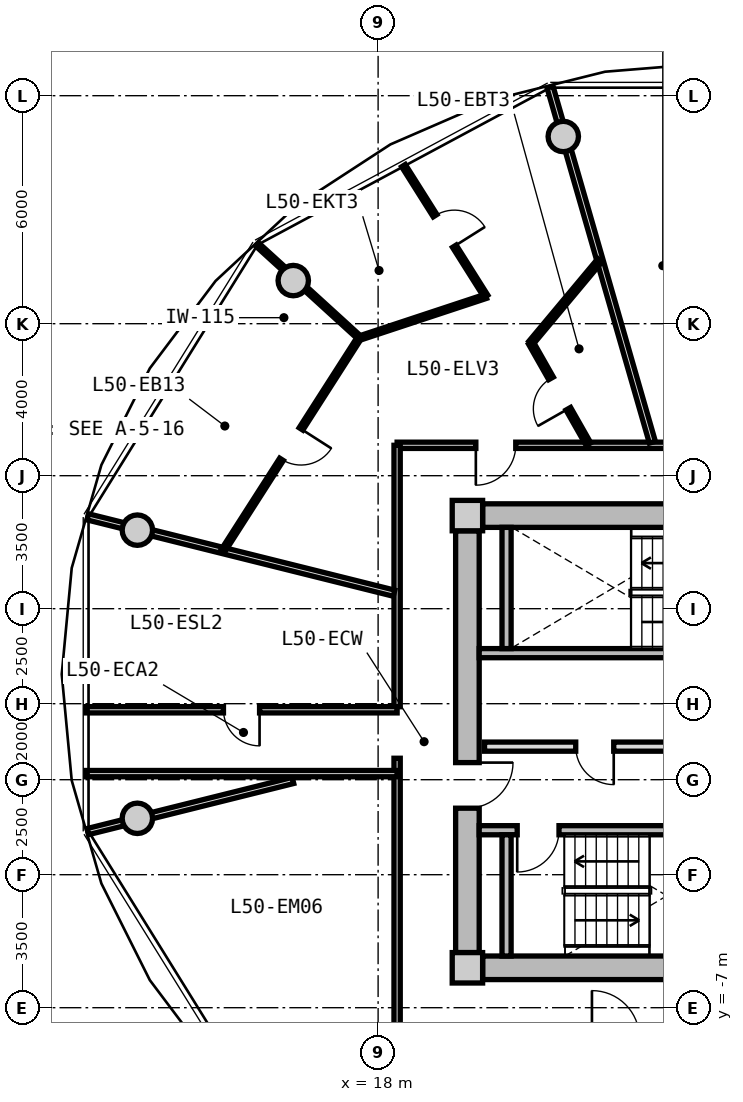
"""IFC4 building model, lengths in metres.
Left out: names, types, materials, properties, quantities, classifications, styles, units other than length and angle.
Written with IfcOpenShell. Run it as: python <this file> out.ifc"""

import sys

from ifc_helpers import new_model, si_unit, direction, frame, frame_2d, origin, origin_2d, place, context, subcontext, project, spatial, rectangle, circle, extrude, source, transform, mapped, element, fill, save


model = new_model("IFC4")
c1 = context("Model", 3, precision=1e-05, world=origin(), true_north=direction((0.0, 1.0)))
c2 = subcontext(c1, "Body", "Model", "MODEL_VIEW")
j1 = project(units=[si_unit("LENGTHUNIT", "METRE"), si_unit("PLANEANGLEUNIT", "RADIAN")], contexts=[c1])
p1 = place(None, origin())
s1 = spatial("IfcSite", under=j1, at=p1, CompositionType="ELEMENT")
p2 = place(p1, origin())
s2 = spatial("IfcBuilding", under=s1, at=p2, CompositionType="ELEMENT")
p3 = place(p2, frame((0.0, 0.0, 161.75)))
s3 = spatial("IfcBuildingStorey", under=s2, at=p3, CompositionType="ELEMENT", Elevation=161.75)
m1 = source(origin(), c2, "Body", "SweptSolid", [
    extrude(rectangle(XDim=0.8, YDim=0.8, at=origin_2d()), origin(), (0.0, 0.0, 1.0), 3.05),
])
for number, where, z_axis, x_axis in (
    (1, (20.35, -5.95, 0.0), (0.0, 0.0, 1.0), (1.0, 0.0, 0.0)),
    (2, (20.35, 5.95, 0.0), (0.0, 0.0, 1.0), (1.0, 0.0, 0.0)),
):
    element("IfcColumn", number, at=place(p3, frame(where, z_axis=z_axis, x_axis=x_axis)), inside=s3, PredefinedType="COLUMN", context=c2, shape_type="MappedRepresentation", body=[
        mapped(m1, transform((0.0, 0.0, 0.0), x_axis=(1.0, 0.0, 0.0), y_axis=(0.0, 1.0, 0.0), z_axis=(0.0, 0.0, 1.0), scale=1.0)),
    ])
m2 = source(origin(), c2, "Body", "SweptSolid", [
    extrude(rectangle(XDim=14.5, YDim=0.62, at=frame_2d((7.25, 0.0))), origin(), (0.0, 0.0, 1.0), 2.81),
])
for number, where, z_axis, x_axis in (
    (3, (20.75, 5.95, 0.0), (0.0, 0.0, 1.0), (1.0, 0.0, 0.0)),
    (4, (35.25, -5.95, 0.0), (0.0, 0.0, 1.0), (-1.0, 0.0, 0.0)),
):
    element("IfcWall", number, at=place(p3, frame(where, z_axis=z_axis, x_axis=x_axis)), inside=s3, PredefinedType="SHEAR", context=c2, shape_type="MappedRepresentation", body=[
        mapped(m2, transform((0.0, 0.0, 0.0), x_axis=(1.0, 0.0, 0.0), y_axis=(0.0, 1.0, 0.0), z_axis=(0.0, 0.0, 1.0), scale=1.0)),
    ])
m3 = source(origin(), c2, "Body", "SweptSolid", [
    extrude(rectangle(XDim=11.1, YDim=0.62, at=frame_2d((5.55, 0.0))), origin(), (0.0, 0.0, 1.0), 2.81),
])
p4 = place(p3, frame((20.35, -5.55, 0.0), z_axis=(0.0, 0.0, 1.0), x_axis=(0.0, 1.0, 0.0)))
e5 = element("IfcWall", 5, at=p4, inside=s3, PredefinedType="SHEAR", context=c2, shape_type="MappedRepresentation", body=[
    mapped(m3, transform((0.0, 0.0, 0.0), x_axis=(1.0, 0.0, 0.0), y_axis=(0.0, 1.0, 0.0), z_axis=(0.0, 0.0, 1.0), scale=1.0)),
])
p5 = place(p4, frame((3.8, 0.0, 0.0)))
e6 = element("IfcOpeningElement", 6, at=p5, cuts=e5, PredefinedType="OPENING", context=c2, shape_type="SweptSolid", body=[
    extrude(rectangle(XDim=1.2, YDim=2.15, at=frame_2d((0.6, 1.075))), frame((0.0, 0.32, 0.0), z_axis=(0.0, -1.0, 0.0), x_axis=(1.0, 0.0, 0.0)), (0.0, 0.0, 1.0), 0.64),
])
m4 = source(origin(), c2, "Body", "SweptSolid", [
    extrude(circle(Radius=0.4, at=origin_2d()), origin(), (0.0, 0.0, 1.0), 3.05),
])
for number, where, z_axis, x_axis in (
    (7, (22.873, 15.926, 0.0), (0.0, 0.0, 1.0), (1.0, 0.0, 0.0)),
    (8, (15.767, 12.135, 0.0), (0.0, 0.0, 1.0), (1.0, 0.0, 0.0)),
    (9, (11.665, 5.567, 0.0), (0.0, 0.0, 1.0), (1.0, 0.0, 0.0)),
    (10, (11.665, -2.016, 0.0), (0.0, 0.0, 1.0), (1.0, 0.0, 0.0)),
):
    element("IfcColumn", number, at=place(p3, frame(where, z_axis=z_axis, x_axis=x_axis)), inside=s3, PredefinedType="COLUMN", context=c2, shape_type="MappedRepresentation", body=[
        mapped(m4, transform((0.0, 0.0, 0.0), x_axis=(1.0, 0.0, 0.0), y_axis=(0.0, 1.0, 0.0), z_axis=(0.0, 0.0, 1.0), scale=1.0)),
    ])
m5 = source(origin(), c2, "Body", "SweptSolid", [
    extrude(rectangle(XDim=7.88, YDim=0.24, at=frame_2d((3.94, 0.0))), origin(), (0.0, 0.0, 1.0), 2.81),
])
p6 = place(p3, frame((20.66, 2.33, 0.0), z_axis=(0.0, 0.0, 1.0), x_axis=(1.0, 0.0, 0.0)))
e11 = element("IfcWall", 11, at=p6, inside=s3, PredefinedType="PARTITIONING", context=c2, shape_type="MappedRepresentation", body=[
    mapped(m5, transform((0.0, 0.0, 0.0), x_axis=(1.0, 0.0, 0.0), y_axis=(0.0, 1.0, 0.0), z_axis=(0.0, 0.0, 1.0), scale=1.0)),
])
m6 = source(origin(), c2, "Body", "SweptSolid", [
    extrude(rectangle(XDim=3.19, YDim=0.24, at=frame_2d((1.595, 0.0))), origin(), (0.0, 0.0, 1.0), 2.81),
])
p7 = place(p3, frame((21.38, 2.45, 0.0), z_axis=(0.0, 0.0, 1.0), x_axis=(0.0, 1.0, 0.0)))
e12 = element("IfcWall", 12, at=p7, inside=s3, PredefinedType="PARTITIONING", context=c2, shape_type="MappedRepresentation", body=[
    mapped(m6, transform((0.0, 0.0, 0.0), x_axis=(1.0, 0.0, 0.0), y_axis=(0.0, 1.0, 0.0), z_axis=(0.0, 0.0, 1.0), scale=1.0)),
])
p8 = place(p3, frame((20.66, -2.33, 0.0), z_axis=(0.0, 0.0, 1.0), x_axis=(1.0, 0.0, 0.0)))
e13 = element("IfcWall", 13, at=p8, inside=s3, PredefinedType="PARTITIONING", context=c2, shape_type="MappedRepresentation", body=[
    mapped(m5, transform((0.0, 0.0, 0.0), x_axis=(1.0, 0.0, 0.0), y_axis=(0.0, 1.0, 0.0), z_axis=(0.0, 0.0, 1.0), scale=1.0)),
])
p9 = place(p8, frame((1.0, 0.0, 0.0)))
e14 = element("IfcOpeningElement", 14, at=p9, cuts=e13, PredefinedType="OPENING", context=c2, shape_type="SweptSolid", body=[
    extrude(rectangle(XDim=1.1, YDim=2.15, at=frame_2d((0.55, 1.075))), frame((0.0, 0.13, 0.0), z_axis=(0.0, -1.0, 0.0), x_axis=(1.0, 0.0, 0.0)), (0.0, 0.0, 1.0), 0.26),
])
p10 = place(p3, frame((21.38, -5.64, 0.0), z_axis=(0.0, 0.0, 1.0), x_axis=(0.0, 1.0, 0.0)))
e15 = element("IfcWall", 15, at=p10, inside=s3, PredefinedType="PARTITIONING", context=c2, shape_type="MappedRepresentation", body=[
    mapped(m6, transform((0.0, 0.0, 0.0), x_axis=(1.0, 0.0, 0.0), y_axis=(0.0, 1.0, 0.0), z_axis=(0.0, 0.0, 1.0), scale=1.0)),
])
m7 = source(origin(), c2, "Body", "SweptSolid", [
    extrude(rectangle(XDim=7.62, YDim=0.24, at=frame_2d((3.81, 0.0))), origin(), (0.0, 0.0, 1.0), 2.795),
])
p11 = place(p3, frame((20.8, -0.13, 0.0), z_axis=(0.0, 0.0, 1.0), x_axis=(1.0, 0.0, 0.0)))
e16 = element("IfcWall", 16, at=p11, inside=s3, PredefinedType="PARTITIONING", context=c2, shape_type="MappedRepresentation", body=[
    mapped(m7, transform((0.0, 0.0, 0.0), x_axis=(1.0, 0.0, 0.0), y_axis=(0.0, 1.0, 0.0), z_axis=(0.0, 0.0, 1.0), scale=1.0)),
])
p12 = place(p11, frame((6.22, 0.0, 0.0)))
e17 = element("IfcOpeningElement", 17, at=p12, cuts=e16, PredefinedType="OPENING", context=c2, shape_type="SweptSolid", body=[
    extrude(rectangle(XDim=1.0, YDim=2.1, at=frame_2d((0.5, 1.05))), frame((0.0, 0.13, 0.0), z_axis=(0.0, -1.0, 0.0), x_axis=(1.0, 0.0, 0.0)), (0.0, 0.0, 1.0), 0.26),
])
p13 = place(p11, frame((2.4, 0.0, 0.0)))
e18 = element("IfcOpeningElement", 18, at=p13, cuts=e16, PredefinedType="OPENING", context=c2, shape_type="SweptSolid", body=[
    extrude(rectangle(XDim=1.0, YDim=2.1, at=frame_2d((0.5, 1.05))), frame((0.0, 0.13, 0.0), z_axis=(0.0, -1.0, 0.0), x_axis=(1.0, 0.0, 0.0)), (0.0, 0.0, 1.0), 0.26),
])
m8 = source(origin(), c2, "Body", "SweptSolid", [
    extrude(rectangle(XDim=8.58, YDim=0.165, at=frame_2d((4.29, 0.0))), origin(), (0.0, 0.0, 1.0), 2.795),
])
p14 = place(p3, frame((18.5, 7.8, 0.0), z_axis=(0.0, 0.0, 1.0), x_axis=(1.0, 0.0, 0.0)))
e19 = element("IfcWall", 19, at=p14, inside=s3, PredefinedType="PARTITIONING", context=c2, shape_type="MappedRepresentation", body=[
    mapped(m8, transform((0.0, 0.0, 0.0), x_axis=(1.0, 0.0, 0.0), y_axis=(0.0, 1.0, 0.0), z_axis=(0.0, 0.0, 1.0), scale=1.0)),
])
p15 = place(p14, frame((2.072, 0.0, 0.0)))
e20 = element("IfcOpeningElement", 20, at=p15, cuts=e19, PredefinedType="OPENING", context=c2, shape_type="SweptSolid", body=[
    extrude(rectangle(XDim=1.05, YDim=2.15, at=frame_2d((0.525, 1.075))), frame((0.0, 0.093, 0.0), z_axis=(0.0, -1.0, 0.0), x_axis=(1.0, 0.0, 0.0)), (0.0, 0.0, 1.0), 0.185),
])
m9 = source(origin(), c2, "Body", "SweptSolid", [
    extrude(rectangle(XDim=7.365, YDim=0.165, at=frame_2d((3.682, 0.0))), origin(), (0.0, 0.0, 1.0), 2.795),
])
p16 = place(p3, frame((18.5, -7.8, 0.0), z_axis=(0.0, 0.0, 1.0), x_axis=(0.0, 1.0, 0.0)))
e21 = element("IfcWall", 21, at=p16, inside=s3, PredefinedType="PARTITIONING", context=c2, shape_type="MappedRepresentation", body=[
    mapped(m9, transform((0.0, 0.0, 0.0), x_axis=(1.0, 0.0, 0.0), y_axis=(0.0, 1.0, 0.0), z_axis=(0.0, 0.0, 1.0), scale=1.0)),
])
m10 = source(origin(), c2, "Body", "SweptSolid", [
    extrude(rectangle(XDim=6.88, YDim=0.165, at=frame_2d((3.44, 0.0))), origin(), (0.0, 0.0, 1.0), 2.795),
])
p17 = place(p3, frame((18.5, 0.92, 0.0), z_axis=(0.0, 0.0, 1.0), x_axis=(0.0, 1.0, 0.0)))
e22 = element("IfcWall", 22, at=p17, inside=s3, PredefinedType="PARTITIONING", context=c2, shape_type="MappedRepresentation", body=[
    mapped(m10, transform((0.0, 0.0, 0.0), x_axis=(1.0, 0.0, 0.0), y_axis=(0.0, 1.0, 0.0), z_axis=(0.0, 0.0, 1.0), scale=1.0)),
])
m11 = source(origin(), c2, "Body", "SweptSolid", [
    extrude(rectangle(XDim=9.73, YDim=0.165, at=frame_2d((4.865, 0.0))), origin(), (0.0, 0.0, 1.0), 2.345),
])
p18 = place(p3, frame((25.217, 7.88, 0.0), z_axis=(0.0, 0.0, 1.0), x_axis=(-0.27679492614, 0.960929013436, 0.0)))
e23 = element("IfcWall", 23, at=p18, inside=s3, PredefinedType="PARTITIONING", context=c2, shape_type="MappedRepresentation", body=[
    mapped(m11, transform((0.0, 0.0, 0.0), x_axis=(1.0, 0.0, 0.0), y_axis=(0.0, 1.0, 0.0), z_axis=(0.0, 0.0, 1.0), scale=1.0)),
])
m12 = source(origin(), c2, "Body", "SweptSolid", [
    extrude(rectangle(XDim=8.305, YDim=0.165, at=frame_2d((4.153, 0.0))), origin(), (0.0, 0.0, 1.0), 2.345),
])
p19 = place(p3, frame((18.42, 3.908, 0.0), z_axis=(0.0, 0.0, 1.0), x_axis=(-0.970309994378, 0.241864662175, 0.0)))
e24 = element("IfcWall", 24, at=p19, inside=s3, PredefinedType="PARTITIONING", context=c2, shape_type="MappedRepresentation", body=[
    mapped(m12, transform((0.0, 0.0, 0.0), x_axis=(1.0, 0.0, 0.0), y_axis=(0.0, 1.0, 0.0), z_axis=(0.0, 0.0, 1.0), scale=1.0)),
])
m13 = source(origin(), c2, "Body", "SweptSolid", [
    extrude(rectangle(XDim=5.564, YDim=0.165, at=frame_2d((2.782, 0.0))), origin(), (0.0, 0.0, 1.0), 2.345),
])
p20 = place(p3, frame((15.76, -1.02, 0.0), z_axis=(0.0, 0.0, 1.0), x_axis=(-0.970315176167, -0.241843872984, 0.0)))
e25 = element("IfcWall", 25, at=p20, inside=s3, PredefinedType="PARTITIONING", context=c2, shape_type="MappedRepresentation", body=[
    mapped(m13, transform((0.0, 0.0, 0.0), x_axis=(1.0, 0.0, 0.0), y_axis=(0.0, 1.0, 0.0), z_axis=(0.0, 0.0, 1.0), scale=1.0)),
])
m14 = source(origin(), c2, "Body", "SweptSolid", [
    extrude(rectangle(XDim=8.189, YDim=0.165, at=frame_2d((4.094, 0.0))), origin(), (0.0, 0.0, 1.0), 2.795),
])
p21 = place(p3, frame((10.311, 0.84, 0.0), z_axis=(0.0, 0.0, 1.0), x_axis=(1.0, 0.0, 0.0)))
e26 = element("IfcWall", 26, at=p21, inside=s3, PredefinedType="PARTITIONING", context=c2, shape_type="MappedRepresentation", body=[
    mapped(m14, transform((0.0, 0.0, 0.0), x_axis=(1.0, 0.0, 0.0), y_axis=(0.0, 1.0, 0.0), z_axis=(0.0, 0.0, 1.0), scale=1.0)),
])
p22 = place(p21, frame((3.619, 0.0, 0.0)))
e27 = element("IfcOpeningElement", 27, at=p22, cuts=e26, PredefinedType="OPENING", context=c2, shape_type="SweptSolid", body=[
    extrude(rectangle(XDim=0.95, YDim=2.1, at=frame_2d((0.475, 1.05))), frame((0.0, 0.093, 0.0), z_axis=(0.0, -1.0, 0.0), x_axis=(1.0, 0.0, 0.0)), (0.0, 0.0, 1.0), 0.185),
])
p23 = place(p3, frame((18.5, -0.84, 0.0), z_axis=(0.0, 0.0, 1.0), x_axis=(-1.0, 0.0, 0.0)))
e28 = element("IfcWall", 28, at=p23, inside=s3, PredefinedType="PARTITIONING", context=c2, shape_type="MappedRepresentation", body=[
    mapped(m14, transform((0.0, 0.0, 0.0), x_axis=(1.0, 0.0, 0.0), y_axis=(0.0, 1.0, 0.0), z_axis=(0.0, 0.0, 1.0), scale=1.0)),
])
m15 = source(origin(), c2, "Body", "SweptSolid", [
    extrude(rectangle(XDim=6.654, YDim=0.115, at=frame_2d((3.327, 0.0))), origin(), (0.0, 0.0, 1.0), 2.795),
])
p24 = place(p3, frame((17.509, 10.632, 0.0), z_axis=(0.0, 0.0, 1.0), x_axis=(-0.53923796816, -0.842153438332, 0.0)))
e29 = element("IfcWall", 29, at=p24, inside=s3, PredefinedType="PARTITIONING", context=c2, shape_type="MappedRepresentation", body=[
    mapped(m15, transform((0.0, 0.0, 0.0), x_axis=(1.0, 0.0, 0.0), y_axis=(0.0, 1.0, 0.0), z_axis=(0.0, 0.0, 1.0), scale=1.0)),
])
p25 = place(p24, frame((2.852, 0.0, 0.0)))
e30 = element("IfcOpeningElement", 30, at=p25, cuts=e29, PredefinedType="OPENING", context=c2, shape_type="SweptSolid", body=[
    extrude(rectangle(XDim=0.95, YDim=2.1, at=frame_2d((0.475, 1.05))), frame((0.0, 0.067, 0.0), z_axis=(0.0, -1.0, 0.0), x_axis=(1.0, 0.0, 0.0)), (0.0, 0.0, 1.0), 0.135),
])
m16 = source(origin(), c2, "Body", "SweptSolid", [
    extrude(rectangle(XDim=3.648, YDim=0.115, at=frame_2d((1.824, 0.0))), origin(), (0.0, 0.0, 1.0), 2.345),
])
p26 = place(p3, frame((17.509, 10.632, 0.0), z_axis=(0.0, 0.0, 1.0), x_axis=(-0.739109697605, 0.67358507622, 0.0)))
e31 = element("IfcWall", 31, at=p26, inside=s3, PredefinedType="PARTITIONING", context=c2, shape_type="MappedRepresentation", body=[
    mapped(m16, transform((0.0, 0.0, 0.0), x_axis=(1.0, 0.0, 0.0), y_axis=(0.0, 1.0, 0.0), z_axis=(0.0, 0.0, 1.0), scale=1.0)),
])
m17 = source(origin(), c2, "Body", "SweptSolid", [
    extrude(rectangle(XDim=3.064, YDim=0.14, at=frame_2d((1.532, 0.0))), origin(), (0.0, 0.0, 1.0), 2.795),
])
p27 = place(p3, frame((23.534, 7.83, 0.0), z_axis=(0.0, 0.0, 1.0), x_axis=(-0.494103864861, 0.869402881712, 0.0)))
e32 = element("IfcWall", 32, at=p27, inside=s3, PredefinedType="PARTITIONING", context=c2, shape_type="MappedRepresentation", body=[
    mapped(m17, transform((0.0, 0.0, 0.0), x_axis=(1.0, 0.0, 0.0), y_axis=(0.0, 1.0, 0.0), z_axis=(0.0, 0.0, 1.0), scale=1.0)),
])
p28 = place(p27, frame((1.072, 0.0, 0.0)))
e33 = element("IfcOpeningElement", 33, at=p28, cuts=e32, PredefinedType="OPENING", context=c2, shape_type="SweptSolid", body=[
    extrude(rectangle(XDim=0.92, YDim=2.1, at=frame_2d((0.46, 1.05))), frame((0.0, 0.08, 0.0), z_axis=(0.0, -1.0, 0.0), x_axis=(1.0, 0.0, 0.0)), (0.0, 0.0, 1.0), 0.16),
])
m18 = source(origin(), c2, "Body", "SweptSolid", [
    extrude(rectangle(XDim=2.833, YDim=0.14, at=frame_2d((1.417, 0.0))), origin(), (0.0, 0.0, 1.0), 2.795),
])
p29 = place(p3, frame((22.02, 10.494, 0.0), z_axis=(0.0, 0.0, 1.0), x_axis=(0.64098072766, 0.767556972979, 0.0)))
e34 = element("IfcWall", 34, at=p29, inside=s3, PredefinedType="PARTITIONING", context=c2, shape_type="MappedRepresentation", body=[
    mapped(m18, transform((0.0, 0.0, 0.0), x_axis=(1.0, 0.0, 0.0), y_axis=(0.0, 1.0, 0.0), z_axis=(0.0, 0.0, 1.0), scale=1.0)),
])
m19 = source(origin(), c2, "Body", "SweptSolid", [
    extrude(rectangle(XDim=4.066, YDim=0.115, at=frame_2d((2.033, 0.0))), origin(), (0.0, 0.0, 1.0), 2.795),
])
p30 = place(p3, frame((20.838, 11.721, 0.0), z_axis=(0.0, 0.0, 1.0), x_axis=(-0.533669868169, 0.8456928945, 0.0)))
e35 = element("IfcWall", 35, at=p30, inside=s3, PredefinedType="PARTITIONING", context=c2, shape_type="MappedRepresentation", body=[
    mapped(m19, transform((0.0, 0.0, 0.0), x_axis=(1.0, 0.0, 0.0), y_axis=(0.0, 1.0, 0.0), z_axis=(0.0, 0.0, 1.0), scale=1.0)),
])
p31 = place(p30, frame((1.558, 0.0, 0.0)))
e36 = element("IfcOpeningElement", 36, at=p31, cuts=e35, PredefinedType="OPENING", context=c2, shape_type="SweptSolid", body=[
    extrude(rectangle(XDim=0.95, YDim=2.1, at=frame_2d((0.475, 1.05))), frame((0.0, 0.067, 0.0), z_axis=(0.0, -1.0, 0.0), x_axis=(1.0, 0.0, 0.0)), (0.0, 0.0, 1.0), 0.135),
])
m20 = source(origin(), c2, "Body", "SweptSolid", [
    extrude(rectangle(XDim=3.496, YDim=0.115, at=frame_2d((1.748, 0.0))), origin(), (0.0, 0.0, 1.0), 2.795),
])
p32 = place(p3, frame((20.838, 11.721, 0.0), z_axis=(0.0, 0.0, 1.0), x_axis=(-0.949420852529, -0.314006440672, 0.0)))
e37 = element("IfcWall", 37, at=p32, inside=s3, PredefinedType="PARTITIONING", context=c2, shape_type="MappedRepresentation", body=[
    mapped(m20, transform((0.0, 0.0, 0.0), x_axis=(1.0, 0.0, 0.0), y_axis=(0.0, 1.0, 0.0), z_axis=(0.0, 0.0, 1.0), scale=1.0)),
])
m21 = source(origin(), c2, "Body", "SweptSolid", [
    extrude(rectangle(XDim=1.1, YDim=2.15, at=frame_2d((0.55, 1.075))), frame((0.0, 0.025, 0.0), z_axis=(0.0, -1.0, 0.0), x_axis=(1.0, 0.0, 0.0)), (0.0, 0.0, 1.0), 0.05),
])
p33 = place(p9, frame((1.1, 0.0, 0.0), z_axis=(0.0, 0.0, 1.0), x_axis=(-1.0, 0.0, 0.0)))
e38 = element("IfcDoor", 38, at=p33, inside=s3, OperationType="SINGLE_SWING_RIGHT", PredefinedType="DOOR", context=c2, shape_type="MappedRepresentation", body=[
    mapped(m21, transform((0.0, 0.0, 0.0), x_axis=(1.0, 0.0, 0.0), y_axis=(0.0, 1.0, 0.0), z_axis=(0.0, 0.0, 1.0), scale=1.0)),
])
fill(e14, e38)
m22 = source(origin(), c2, "Body", "SweptSolid", [
    extrude(rectangle(XDim=1.2, YDim=2.15, at=frame_2d((0.6, 1.075))), frame((0.0, 0.025, 0.0), z_axis=(0.0, -1.0, 0.0), x_axis=(1.0, 0.0, 0.0)), (0.0, 0.0, 1.0), 0.05),
])
p34 = place(p5, frame((1.2, 0.0, 0.0), z_axis=(0.0, 0.0, 1.0), x_axis=(-1.0, 0.0, 0.0)))
e39 = element("IfcDoor", 39, at=p34, inside=s3, OperationType="SINGLE_SWING_LEFT", PredefinedType="DOOR", context=c2, shape_type="MappedRepresentation", body=[
    mapped(m22, transform((0.0, 0.0, 0.0), x_axis=(1.0, 0.0, 0.0), y_axis=(0.0, 1.0, 0.0), z_axis=(0.0, 0.0, 1.0), scale=1.0)),
])
fill(e6, e39)
m23 = source(origin(), c2, "Body", "SweptSolid", [
    extrude(rectangle(XDim=1.0, YDim=2.1, at=frame_2d((0.5, 1.05))), frame((0.0, 0.025, 0.0), z_axis=(0.0, -1.0, 0.0), x_axis=(1.0, 0.0, 0.0)), (0.0, 0.0, 1.0), 0.05),
])
p35 = place(p13, frame((1.0, 0.0, 0.0), z_axis=(0.0, 0.0, 1.0), x_axis=(-1.0, 0.0, 0.0)))
e40 = element("IfcDoor", 40, at=p35, inside=s3, OperationType="SINGLE_SWING_LEFT", PredefinedType="DOOR", context=c2, shape_type="MappedRepresentation", body=[
    mapped(m23, transform((0.0, 0.0, 0.0), x_axis=(1.0, 0.0, 0.0), y_axis=(0.0, 1.0, 0.0), z_axis=(0.0, 0.0, 1.0), scale=1.0)),
])
fill(e18, e40)
m24 = source(origin(), c2, "Body", "SweptSolid", [
    extrude(rectangle(XDim=0.95, YDim=2.1, at=frame_2d((0.475, 1.05))), frame((0.0, 0.025, 0.0), z_axis=(0.0, -1.0, 0.0), x_axis=(1.0, 0.0, 0.0)), (0.0, 0.0, 1.0), 0.05),
])
p36 = place(p22, frame((0.95, 0.0, 0.0), z_axis=(0.0, 0.0, 1.0), x_axis=(-1.0, 0.0, 0.0)))
e41 = element("IfcDoor", 41, at=p36, inside=s3, OperationType="SINGLE_SWING_LEFT", PredefinedType="DOOR", context=c2, shape_type="MappedRepresentation", body=[
    mapped(m24, transform((0.0, 0.0, 0.0), x_axis=(1.0, 0.0, 0.0), y_axis=(0.0, 1.0, 0.0), z_axis=(0.0, 0.0, 1.0), scale=1.0)),
])
fill(e27, e41)
m25 = source(origin(), c2, "Body", "SweptSolid", [
    extrude(rectangle(XDim=1.05, YDim=2.15, at=frame_2d((0.525, 1.075))), frame((0.0, 0.025, 0.0), z_axis=(0.0, -1.0, 0.0), x_axis=(1.0, 0.0, 0.0)), (0.0, 0.0, 1.0), 0.05),
])
p37 = place(p15, frame((1.05, 0.0, 0.0), z_axis=(0.0, 0.0, 1.0), x_axis=(-1.0, 0.0, 0.0)))
e42 = element("IfcDoor", 42, at=p37, inside=s3, OperationType="SINGLE_SWING_RIGHT", PredefinedType="DOOR", context=c2, shape_type="MappedRepresentation", body=[
    mapped(m25, transform((0.0, 0.0, 0.0), x_axis=(1.0, 0.0, 0.0), y_axis=(0.0, 1.0, 0.0), z_axis=(0.0, 0.0, 1.0), scale=1.0)),
])
fill(e20, e42)
m26 = source(origin(), c2, "Body", "SweptSolid", [
    extrude(rectangle(XDim=0.92, YDim=2.1, at=frame_2d((0.46, 1.05))), frame((0.0, 0.025, 0.0), z_axis=(0.0, -1.0, 0.0), x_axis=(1.0, 0.0, 0.0)), (0.0, 0.0, 1.0), 0.05),
])
p38 = place(p28, origin())
e43 = element("IfcDoor", 43, at=p38, inside=s3, OperationType="SINGLE_SWING_LEFT", PredefinedType="DOOR", context=c2, shape_type="MappedRepresentation", body=[
    mapped(m26, transform((0.0, 0.0, 0.0), x_axis=(1.0, 0.0, 0.0), y_axis=(0.0, 1.0, 0.0), z_axis=(0.0, 0.0, 1.0), scale=1.0)),
])
fill(e33, e43)
p39 = place(p31, frame((0.95, 0.0, 0.0), z_axis=(0.0, 0.0, 1.0), x_axis=(-1.0, 0.0, 0.0)))
e44 = element("IfcDoor", 44, at=p39, inside=s3, OperationType="SINGLE_SWING_RIGHT", PredefinedType="DOOR", context=c2, shape_type="MappedRepresentation", body=[
    mapped(m24, transform((0.0, 0.0, 0.0), x_axis=(1.0, 0.0, 0.0), y_axis=(0.0, 1.0, 0.0), z_axis=(0.0, 0.0, 1.0), scale=1.0)),
])
fill(e36, e44)
p40 = place(p25, origin())
e45 = element("IfcDoor", 45, at=p40, inside=s3, OperationType="SINGLE_SWING_LEFT", PredefinedType="DOOR", context=c2, shape_type="MappedRepresentation", body=[
    mapped(m24, transform((0.0, 0.0, 0.0), x_axis=(1.0, 0.0, 0.0), y_axis=(0.0, 1.0, 0.0), z_axis=(0.0, 0.0, 1.0), scale=1.0)),
])
fill(e30, e45)
save(model, sys.argv[1])
